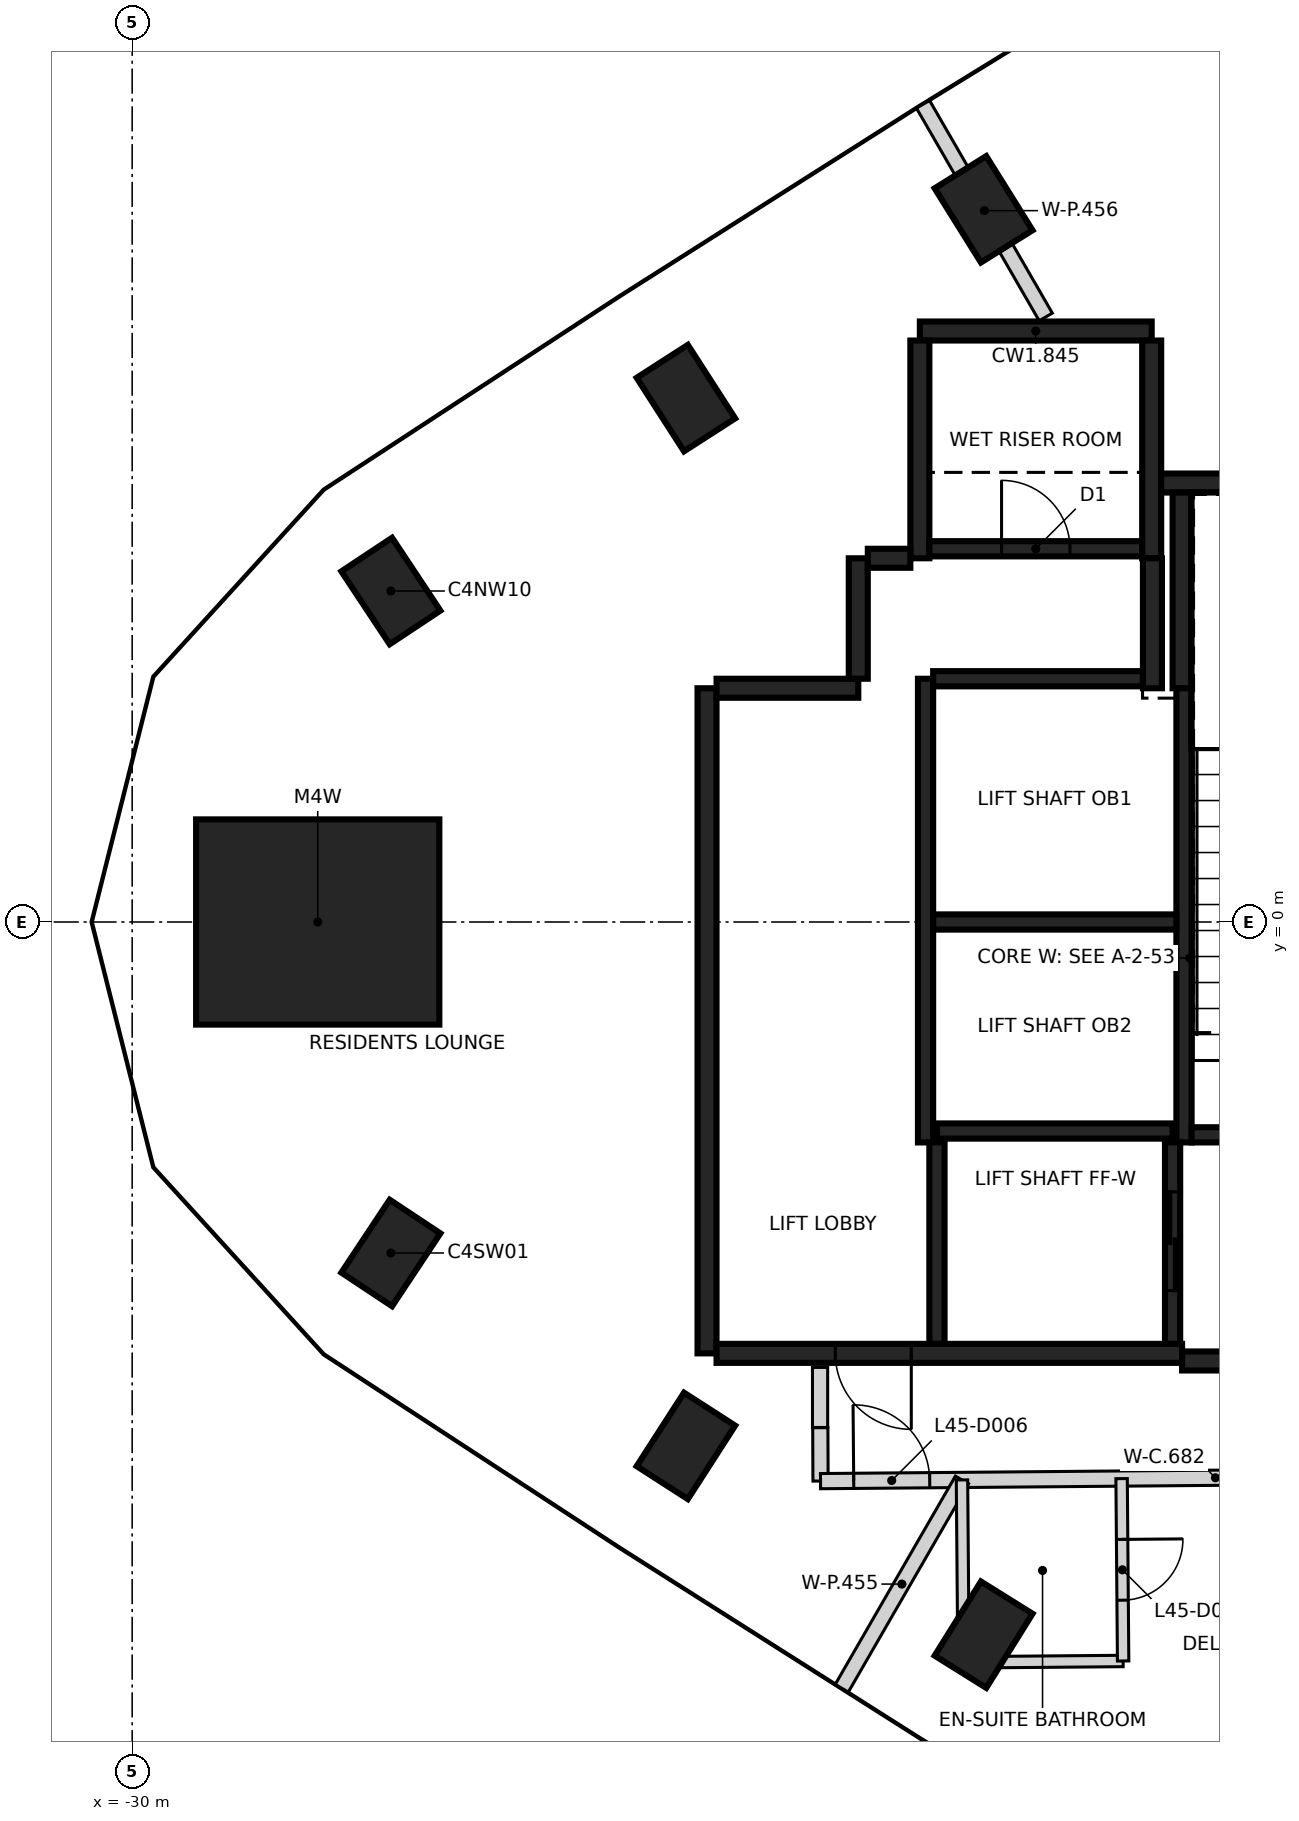
"""IFC4 building model, lengths in metres.
Left out: names, types, materials, properties, quantities, classifications, styles, units other than length and angle.
Written with IfcOpenShell. Run it as: python <this file> out.ifc"""

import sys

from ifc_helpers import new_model, si_unit, direction, frame, frame_2d, origin, origin_2d, place, context, subcontext, project, spatial, rectangle, extrude, element, fill, save


model = new_model("IFC4")
c1 = context("Model", 3, precision=1e-05, world=origin(), true_north=direction((0.0, 1.0)))
c2 = subcontext(c1, "Body", "Model", "MODEL_VIEW")
j1 = project(units=[si_unit("LENGTHUNIT", "METRE"), si_unit("PLANEANGLEUNIT", "RADIAN")], contexts=[c1])
p1 = place(None, origin())
s1 = spatial("IfcSite", under=j1, at=p1, CompositionType="ELEMENT")
p2 = place(p1, origin())
s2 = spatial("IfcBuilding", under=s1, at=p2, CompositionType="ELEMENT")
p3 = place(p2, frame((0.0, 0.0, 182.8)))
s3 = spatial("IfcBuildingStorey", under=s2, at=p3, CompositionType="ELEMENT", Elevation=182.8)
for number, where, z_axis, x_axis in (
    (1, (-18.799, 9.376, -0.35), (0.0, 0.0, 1.0), (-0.529, 0.848, 0.0)),
    (2, (-22.715, 6.892, -0.35), (0.0, 0.0, 1.0), (-0.541, 0.841, 0.0)),
    (3, (-26.597, 4.354, -0.35), (0.0, 0.0, 1.0), (-0.553, 0.833, 0.0)),
    (4, (-26.597, -4.354, -0.35), (0.0, 0.0, 1.0), (0.553, 0.833, 0.0)),
    (5, (-22.715, -6.892, -0.35), (0.0, 0.0, 1.0), (0.541, 0.841, 0.0)),
    (6, (-18.799, -9.376, -0.35), (0.0, 0.0, 1.0), (0.529, 0.848, 0.0)),
):
    element("IfcColumn", number, at=place(p3, frame(where, z_axis=z_axis, x_axis=x_axis)), inside=s3, PredefinedType="COLUMN", context=c2, shape_type="SweptSolid", body=[
        extrude(rectangle(XDim=1.15, YDim=0.8, at=origin_2d()), origin(), (0.0, 0.0, 1.0), 3.6),
    ])
p4 = place(p3, frame((-27.559, 0.0, -0.35), z_axis=(0.0, 0.0, 1.0), x_axis=(1.0, 0.0, 0.0)))
e7 = element("IfcColumn", 7, at=p4, inside=s3, PredefinedType="COLUMN", context=c2, shape_type="SweptSolid", body=[
    extrude(rectangle(XDim=3.2, YDim=2.7, at=origin_2d()), origin(), (0.0, 0.0, 1.0), 3.6),
])
p5 = place(p3, frame((-22.437, -5.675, 0.0), z_axis=(0.0, 0.0, 1.0), x_axis=(0.0, 1.0, 0.0)))
e8 = element("IfcWall", 8, at=p5, inside=s3, PredefinedType="SHEAR", context=c2, shape_type="SweptSolid", body=[
    extrude(rectangle(XDim=8.75, YDim=0.25, at=frame_2d((4.375, 0.0))), origin(), (0.0, 0.0, 1.0), 3.25),
])
p6 = place(p3, frame((-16.187, -5.675, 0.0), z_axis=(0.0, 0.0, 1.0), x_axis=(-1.0, 0.0, 0.0)))
e9 = element("IfcWall", 9, at=p6, inside=s3, PredefinedType="SHEAR", context=c2, shape_type="SweptSolid", body=[
    extrude(rectangle(XDim=6.125, YDim=0.25, at=frame_2d((3.062, 0.0))), origin(), (0.0, 0.0, 1.0), 3.25),
])
p7 = place(p6, frame((3.563, 0.0, 0.0)))
e10 = element("IfcOpeningElement", 10, at=p7, cuts=e9, PredefinedType="OPENING", context=c2, shape_type="SweptSolid", body=[
    extrude(rectangle(XDim=1.0, YDim=2.1, at=frame_2d((0.5, 1.05))), frame((0.0, 0.135, 0.0), z_axis=(0.0, -1.0, 0.0), x_axis=(1.0, 0.0, 0.0)), (0.0, 0.0, 1.0), 0.27),
])
p8 = place(p3, frame((-10.963, -5.775, 0.0), z_axis=(0.0, 0.0, 1.0), x_axis=(-1.0, 0.0, 0.0)))
e11 = element("IfcWall", 11, at=p8, inside=s3, PredefinedType="SHEAR", context=c2, shape_type="SweptSolid", body=[
    extrude(rectangle(XDim=5.225, YDim=0.25, at=frame_2d((2.612, 0.0))), origin(), (0.0, 0.0, 1.0), 3.25),
])
p9 = place(p3, frame((-16.472, 5.775, 0.0), z_axis=(0.0, 0.0, 1.0), x_axis=(1.0, 0.0, 0.0)))
e12 = element("IfcWall", 12, at=p9, inside=s3, PredefinedType="SHEAR", context=c2, shape_type="SweptSolid", body=[
    extrude(rectangle(XDim=5.51, YDim=0.25, at=frame_2d((2.755, 0.0))), origin(), (0.0, 0.0, 1.0), 3.25),
])
p10 = place(p3, frame((-19.637, 7.775, 0.0), z_axis=(0.0, 0.0, 1.0), x_axis=(1.0, 0.0, 0.0)))
e13 = element("IfcWall", 13, at=p10, inside=s3, PredefinedType="SHEAR", context=c2, shape_type="SweptSolid", body=[
    extrude(rectangle(XDim=3.05, YDim=0.25, at=frame_2d((1.525, 0.0))), origin(), (0.0, 0.0, 1.0), 3.25),
])
for number, where, z_axis, x_axis in (
    (14, (-16.587, 7.65, 0.0), (0.0, 0.0, 1.0), (0.0, -1.0, 0.0)),
    (15, (-19.637, 4.785, 0.0), (0.0, 0.0, 1.0), (0.0, 1.0, 0.0)),
):
    element("IfcWall", number, at=place(p3, frame(where, z_axis=z_axis, x_axis=x_axis)), inside=s3, PredefinedType="SHEAR", context=c2, shape_type="SweptSolid", body=[
        extrude(rectangle(XDim=2.865, YDim=0.25, at=frame_2d((1.432, 0.0))), origin(), (0.0, 0.0, 1.0), 3.25),
    ])
p11 = place(p3, frame((-16.187, 3.075, 0.0), z_axis=(0.0, 0.0, 1.0), x_axis=(0.0, 1.0, 0.0)))
e16 = element("IfcWall", 16, at=p11, inside=s3, PredefinedType="SHEAR", context=c2, shape_type="SweptSolid", body=[
    extrude(rectangle(XDim=2.575, YDim=0.25, at=frame_2d((1.287, 0.0))), origin(), (0.0, 0.0, 1.0), 3.25),
])
p12 = place(p3, frame((-22.312, 3.075, 0.0), z_axis=(0.0, 0.0, 1.0), x_axis=(1.0, 0.0, 0.0)))
e17 = element("IfcWall", 17, at=p12, inside=s3, PredefinedType="SHEAR", context=c2, shape_type="SweptSolid", body=[
    extrude(rectangle(XDim=1.865, YDim=0.25, at=frame_2d((0.932, 0.0))), origin(), (0.0, 0.0, 1.0), 3.25),
])
p13 = place(p3, frame((-16.577, 4.785, 0.0), z_axis=(0.0, 0.0, 1.0), x_axis=(0.0, -1.0, 0.0)))
e18 = element("IfcWall", 18, at=p13, inside=s3, PredefinedType="SHEAR", context=c2, shape_type="SweptSolid", body=[
    extrude(rectangle(XDim=1.71, YDim=0.25, at=frame_2d((0.855, 0.0))), origin(), (0.0, 0.0, 1.0), 3.25),
])
p14 = place(p3, frame((-20.447, 3.2, 0.0), z_axis=(0.0, 0.0, 1.0), x_axis=(0.0, 1.0, 0.0)))
e19 = element("IfcWall", 19, at=p14, inside=s3, PredefinedType="SHEAR", context=c2, shape_type="SweptSolid", body=[
    extrude(rectangle(XDim=1.584, YDim=0.25, at=frame_2d((0.792, 0.0))), origin(), (0.0, 0.0, 1.0), 3.25),
])
p15 = place(p3, frame((-20.322, 4.785, 0.0), z_axis=(0.0, 0.0, 1.0), x_axis=(1.0, 0.0, 0.0)))
e20 = element("IfcWall", 20, at=p15, inside=s3, PredefinedType="SHEAR", context=c2, shape_type="SweptSolid", body=[
    extrude(rectangle(XDim=0.559, YDim=0.25, at=frame_2d((0.28, 0.0))), origin(), (0.0, 0.0, 1.0), 3.25),
])
p16 = place(p3, frame((-16.162, 3.074, 0.0), z_axis=(0.0, 0.0, 1.0), x_axis=(0.0, -1.0, 0.0)))
e21 = element("IfcWall", 21, at=p16, inside=s3, PredefinedType="SHEAR", context=c2, shape_type="SweptSolid", body=[
    extrude(rectangle(XDim=5.974, YDim=0.2, at=frame_2d((2.987, 0.0))), origin(), (0.0, 0.0, 1.0), 3.25),
])
p17 = place(p3, frame((-19.562, -2.9, 0.0), z_axis=(0.0, 0.0, 1.0), x_axis=(0.0, 1.0, 0.0)))
e22 = element("IfcWall", 22, at=p17, inside=s3, PredefinedType="SHEAR", context=c2, shape_type="SweptSolid", body=[
    extrude(rectangle(XDim=6.1, YDim=0.2, at=frame_2d((3.05, 0.0))), origin(), (0.0, 0.0, 1.0), 3.25),
])
p18 = place(p3, frame((-10.963, -2.8, 0.0), z_axis=(0.0, 0.0, 1.0), x_axis=(-1.0, 0.0, 0.0)))
e23 = element("IfcWall", 23, at=p18, inside=s3, PredefinedType="SHEAR", context=c2, shape_type="SweptSolid", body=[
    extrude(rectangle(XDim=5.098, YDim=0.2, at=frame_2d((2.549, 0.0))), origin(), (0.0, 0.0, 1.0), 3.25),
])
p19 = place(p18, frame((1.774, 0.0, 0.0)))
e24 = element("IfcOpeningElement", 24, at=p19, cuts=e23, PredefinedType="OPENING", context=c2, shape_type="SweptSolid", body=[
    extrude(rectangle(XDim=1.4, YDim=2.1, at=frame_2d((0.7, 1.05))), frame((0.0, 0.11, 0.0), z_axis=(0.0, -1.0, 0.0), x_axis=(1.0, 0.0, 0.0)), (0.0, 0.0, 1.0), 0.22),
])
p20 = place(p3, frame((-16.263, 0.0, 0.0), z_axis=(0.0, 0.0, 1.0), x_axis=(-1.0, 0.0, 0.0)))
e25 = element("IfcWall", 25, at=p20, inside=s3, PredefinedType="SHEAR", context=c2, shape_type="SweptSolid", body=[
    extrude(rectangle(XDim=3.198, YDim=0.2, at=frame_2d((1.599, 0.0))), origin(), (0.0, 0.0, 1.0), 3.25),
])
p21 = place(p3, frame((-19.511, 4.91, 0.0), z_axis=(0.0, 0.0, 1.0), x_axis=(1.0, 0.0, 0.0)))
e26 = element("IfcWall", 26, at=p21, inside=s3, PredefinedType="SHEAR", context=c2, shape_type="SweptSolid", body=[
    extrude(rectangle(XDim=2.798, YDim=0.2, at=frame_2d((1.399, 0.0))), origin(), (0.0, 0.0, 1.0), 3.25),
])
p22 = place(p21, frame((0.949, 0.0, 0.0)))
e27 = element("IfcOpeningElement", 27, at=p22, cuts=e26, PredefinedType="OPENING", context=c2, shape_type="SweptSolid", body=[
    extrude(rectangle(XDim=0.9, YDim=2.1, at=frame_2d((0.45, 1.05))), frame((0.0, 0.11, 0.0), z_axis=(0.0, -1.0, 0.0), x_axis=(1.0, 0.0, 0.0)), (0.0, 0.0, 1.0), 0.22),
])
p23 = place(p3, frame((-19.462, 3.2, 0.0), z_axis=(0.0, 0.0, 1.0), x_axis=(1.0, 0.0, 0.0)))
e28 = element("IfcWall", 28, at=p23, inside=s3, PredefinedType="SHEAR", context=c2, shape_type="SweptSolid", body=[
    extrude(rectangle(XDim=2.759, YDim=0.2, at=frame_2d((1.379, 0.0))), origin(), (0.0, 0.0, 1.0), 3.25),
])
p24 = place(p3, frame((-19.412, -2.75, 0.0), z_axis=(0.0, 0.0, 1.0), x_axis=(1.0, 0.0, 0.0)))
e29 = element("IfcWall", 29, at=p24, inside=s3, PredefinedType="SHEAR", context=c2, shape_type="SweptSolid", body=[
    extrude(rectangle(XDim=3.1, YDim=0.2, at=frame_2d((1.55, 0.0))), origin(), (0.0, 0.0, 1.0), 3.25),
])
p25 = place(p3, frame((-16.312, -2.898, 0.0), z_axis=(0.0, 0.0, 1.0), x_axis=(0.0, -1.0, 0.0)))
e30 = element("IfcWall", 30, at=p25, inside=s3, PredefinedType="SHEAR", context=c2, shape_type="SweptSolid", body=[
    extrude(rectangle(XDim=2.651, YDim=0.2, at=frame_2d((1.325, 0.0))), origin(), (0.0, 0.0, 1.0), 3.25),
])
p26 = place(p25, frame((0.652, 0.0, 0.0)))
e31 = element("IfcOpeningElement", 31, at=p26, cuts=e30, PredefinedType="OPENING", context=c2, shape_type="SweptSolid", body=[
    extrude(rectangle(XDim=1.3, YDim=2.1, at=frame_2d((0.65, 1.05))), frame((0.0, 0.11, 0.0), z_axis=(0.0, -1.0, 0.0), x_axis=(1.0, 0.0, 0.0)), (0.0, 0.0, 1.0), 0.22),
])
p27 = place(p3, frame((-19.412, -5.549, 0.0), z_axis=(0.0, 0.0, 1.0), x_axis=(0.0, 1.0, 0.0)))
e32 = element("IfcWall", 32, at=p27, inside=s3, PredefinedType="SHEAR", context=c2, shape_type="SweptSolid", body=[
    extrude(rectangle(XDim=2.651, YDim=0.2, at=frame_2d((1.325, 0.0))), origin(), (0.0, 0.0, 1.0), 3.25),
])
p28 = place(p3, frame((-20.95, -6.65, 0.0), z_axis=(0.0, 0.0, 1.0), x_axis=(0.0, 1.0, 0.0)))
e33 = element("IfcWall", 33, at=p28, inside=s3, PredefinedType="PARTITIONING", context=c2, shape_type="SweptSolid", body=[
    extrude(rectangle(XDim=0.79, YDim=0.2, at=frame_2d((0.395, 0.0))), origin(), (0.0, 0.0, 1.0), 3.25),
])
p29 = place(p3, frame((-20.947, -6.653, 0.0), z_axis=(0.0, 0.0, 1.0), x_axis=(0.004173876686, -0.999991289339, 0.0)))
e34 = element("IfcWall", 34, at=p29, inside=s3, PredefinedType="PARTITIONING", context=c2, shape_type="SweptSolid", body=[
    extrude(rectangle(XDim=0.702, YDim=0.2, at=frame_2d((0.351, 0.0))), origin(), (0.0, 0.0, 1.0), 3.25),
])
p30 = place(p3, frame((-20.944, -7.356, 0.0), z_axis=(0.0, 0.0, 1.0), x_axis=(0.999963632327, 0.008528424382, 0.0)))
e35 = element("IfcWall", 35, at=p30, inside=s3, PredefinedType="PARTITIONING", context=c2, shape_type="SweptSolid", body=[
    extrude(rectangle(XDim=10.392, YDim=0.2, at=frame_2d((5.196, 0.0))), origin(), (0.0, 0.0, 1.0), 3.25),
])
p31 = place(p30, frame((0.437, 0.0, 0.0)))
e36 = element("IfcOpeningElement", 36, at=p31, cuts=e35, PredefinedType="OPENING", context=c2, shape_type="SweptSolid", body=[
    extrude(rectangle(XDim=1.0, YDim=2.1, at=frame_2d((0.5, 1.05))), frame((0.0, 0.11, 0.0), z_axis=(0.0, -1.0, 0.0), x_axis=(1.0, 0.0, 0.0)), (0.0, 0.0, 1.0), 0.22),
])
p32 = place(p30, frame((5.419, 0.0, 0.0)))
e37 = element("IfcOpeningElement", 37, at=p32, cuts=e35, PredefinedType="OPENING", context=c2, shape_type="SweptSolid", body=[
    extrude(rectangle(XDim=0.95, YDim=2.1, at=frame_2d((0.475, 1.05))), frame((0.0, 0.11, 0.0), z_axis=(0.0, -1.0, 0.0), x_axis=(1.0, 0.0, 0.0)), (0.0, 0.0, 1.0), 0.22),
])
p33 = place(p3, frame((-20.664, -10.081, 0.0), z_axis=(0.0, 0.0, 1.0), x_axis=(0.499782572363, 0.866150899302, 0.0)))
e38 = element("IfcWall", 38, at=p33, inside=s3, PredefinedType="PARTITIONING", context=c2, shape_type="SweptSolid", body=[
    extrude(rectangle(XDim=3.164, YDim=0.2, at=frame_2d((1.582, 0.0))), origin(), (0.0, 0.0, 1.0), 2.35),
])
p34 = place(p3, frame((-19.596, 10.757, 0.0), z_axis=(0.0, 0.0, 1.0), x_axis=(0.499984162302, -0.866034547491, 0.0)))
e39 = element("IfcWall", 39, at=p34, inside=s3, PredefinedType="PARTITIONING", context=c2, shape_type="SweptSolid", body=[
    extrude(rectangle(XDim=3.23, YDim=0.2, at=frame_2d((1.615, 0.0))), origin(), (0.0, 0.0, 1.0), 3.25),
])
p35 = place(p3, frame((-15.645, -13.187, 0.0), z_axis=(0.0, 0.0, 1.0), x_axis=(0.499921913572, 0.866070482311, 0.0)))
e40 = element("IfcWall", 40, at=p35, inside=s3, PredefinedType="PARTITIONING", context=c2, shape_type="SweptSolid", body=[
    extrude(rectangle(XDim=6.816, YDim=0.2, at=frame_2d((3.408, 0.0))), origin(), (0.0, 0.0, 1.0), 3.25),
])
p36 = place(p3, frame((-19.083, -7.34, 0.0), z_axis=(0.0, 0.0, 1.0), x_axis=(0.008341520563, -0.999965208912, 0.0)))
e41 = element("IfcWall", 41, at=p36, inside=s3, PredefinedType="PARTITIONING", context=c2, shape_type="SweptSolid", body=[
    extrude(rectangle(XDim=2.4, YDim=0.15, at=frame_2d((1.2, 0.0))), origin(), (0.0, 0.0, 1.0), 3.25),
])
p37 = place(p3, frame((-19.063, -9.74, 0.0), z_axis=(0.0, 0.0, 1.0), x_axis=(0.999962999255, 0.008602332242, 0.0)))
e42 = element("IfcWall", 42, at=p37, inside=s3, PredefinedType="PARTITIONING", context=c2, shape_type="SweptSolid", body=[
    extrude(rectangle(XDim=2.1, YDim=0.15, at=frame_2d((1.05, 0.0))), origin(), (0.0, 0.0, 1.0), 2.35),
])
p38 = place(p3, frame((-16.983, -7.323, 0.0), z_axis=(0.0, 0.0, 1.0), x_axis=(0.00834491602, -0.999965180582, 0.0)))
e43 = element("IfcWall", 43, at=p38, inside=s3, PredefinedType="PARTITIONING", context=c2, shape_type="SweptSolid", body=[
    extrude(rectangle(XDim=2.399, YDim=0.15, at=frame_2d((1.199, 0.0))), origin(), (0.0, 0.0, 1.0), 3.25),
])
p39 = place(p38, frame((0.8, 0.0, 0.0)))
e44 = element("IfcOpeningElement", 44, at=p39, cuts=e43, PredefinedType="OPENING", context=c2, shape_type="SweptSolid", body=[
    extrude(rectangle(XDim=0.8, YDim=2.1, at=frame_2d((0.4, 1.05))), frame((0.0, 0.085, 0.0), z_axis=(0.0, -1.0, 0.0), x_axis=(1.0, 0.0, 0.0)), (0.0, 0.0, 1.0), 0.17),
])
p40 = place(p26, origin())
e45 = element("IfcDoor", 45, at=p40, inside=s3, OperationType="SLIDING_TO_RIGHT", PredefinedType="DOOR", context=c2, shape_type="SweptSolid", body=[
    extrude(rectangle(XDim=1.3, YDim=2.1, at=frame_2d((0.65, 1.05))), frame((0.0, 0.025, 0.0), z_axis=(0.0, -1.0, 0.0), x_axis=(1.0, 0.0, 0.0)), (0.0, 0.0, 1.0), 0.05),
])
fill(e31, e45)
p41 = place(p7, origin())
e46 = element("IfcDoor", 46, at=p41, inside=s3, OperationType="SINGLE_SWING_LEFT", PredefinedType="DOOR", context=c2, shape_type="SweptSolid", body=[
    extrude(rectangle(XDim=1.0, YDim=2.1, at=frame_2d((0.5, 1.05))), frame((0.0, 0.025, 0.0), z_axis=(0.0, -1.0, 0.0), x_axis=(1.0, 0.0, 0.0)), (0.0, 0.0, 1.0), 0.05),
])
fill(e10, e46)
p42 = place(p22, origin())
e47 = element("IfcDoor", 47, at=p42, inside=s3, OperationType="SINGLE_SWING_LEFT", PredefinedType="DOOR", context=c2, shape_type="SweptSolid", body=[
    extrude(rectangle(XDim=0.9, YDim=2.1, at=frame_2d((0.45, 1.05))), frame((0.0, 0.025, 0.0), z_axis=(0.0, -1.0, 0.0), x_axis=(1.0, 0.0, 0.0)), (0.0, 0.0, 1.0), 0.05),
])
fill(e27, e47)
p43 = place(p31, origin())
e48 = element("IfcDoor", 48, at=p43, inside=s3, OperationType="SINGLE_SWING_LEFT", PredefinedType="DOOR", context=c2, shape_type="SweptSolid", body=[
    extrude(rectangle(XDim=1.0, YDim=2.1, at=frame_2d((0.5, 1.05))), frame((0.0, 0.025, 0.0), z_axis=(0.0, -1.0, 0.0), x_axis=(1.0, 0.0, 0.0)), (0.0, 0.0, 1.0), 0.05),
])
fill(e36, e48)
p44 = place(p39, frame((0.8, 0.0, 0.0), z_axis=(0.0, 0.0, 1.0), x_axis=(-1.0, 0.0, 0.0)))
e49 = element("IfcDoor", 49, at=p44, inside=s3, OperationType="SINGLE_SWING_LEFT", PredefinedType="DOOR", context=c2, shape_type="SweptSolid", body=[
    extrude(rectangle(XDim=0.8, YDim=2.1, at=frame_2d((0.4, 1.05))), frame((0.0, 0.025, 0.0), z_axis=(0.0, -1.0, 0.0), x_axis=(1.0, 0.0, 0.0)), (0.0, 0.0, 1.0), 0.05),
])
fill(e44, e49)
save(model, sys.argv[1])
